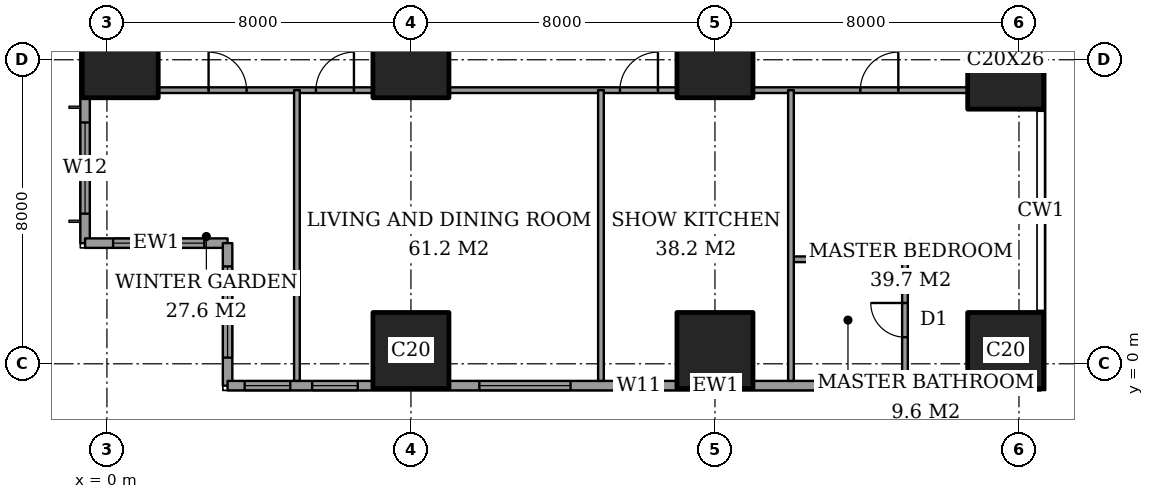
"""IFC4 building model, lengths in metres.
Left out: names, types, materials, properties, quantities, classifications, styles, units other than length and angle.
Written with IfcOpenShell. Run it as: python <this file> out.ifc"""

import sys

from ifc_helpers import new_model, si_unit, direction, frame, frame_2d, origin, origin_2d, place, context, subcontext, project, spatial, rectangle, extrude, element, fill, save


model = new_model("IFC4")
c1 = context("Model", 3, precision=1e-05, world=origin(), true_north=direction((0.0, 1.0)))
c2 = subcontext(c1, "Body", "Model", "MODEL_VIEW")
j1 = project(units=[si_unit("LENGTHUNIT", "METRE"), si_unit("PLANEANGLEUNIT", "RADIAN")], contexts=[c1])
p1 = place(None, origin())
s1 = spatial("IfcSite", under=j1, at=p1, CompositionType="ELEMENT")
p2 = place(p1, origin())
s2 = spatial("IfcBuilding", under=s1, at=p2, CompositionType="ELEMENT")
p3 = place(p2, frame((0.0, 0.0, 161.0)))
s3 = spatial("IfcBuildingStorey", under=s2, at=p3, CompositionType="ELEMENT", Elevation=161.0)
for number, where, z_axis, x_axis in (
    (1, (0.35, 8.0, 0.0), (0.0, 0.0, 1.0), (1.0, 0.0, 0.0)),
    (2, (8.0, 0.35, 0.0), (0.0, 0.0, 1.0), (1.0, 0.0, 0.0)),
    (3, (8.0, 8.0, 0.0), (0.0, 0.0, 1.0), (1.0, 0.0, 0.0)),
    (4, (16.0, 0.35, 0.0), (0.0, 0.0, 1.0), (1.0, 0.0, 0.0)),
    (5, (16.0, 8.0, 0.0), (0.0, 0.0, 1.0), (1.0, 0.0, 0.0)),
    (6, (23.65, 0.35, 0.0), (0.0, 0.0, 1.0), (1.0, 0.0, 0.0)),
):
    element("IfcColumn", number, at=place(p3, frame(where, z_axis=z_axis, x_axis=x_axis)), inside=s3, PredefinedType="COLUMN", context=c2, shape_type="SweptSolid", body=[
        extrude(rectangle(XDim=2.0, YDim=2.0, at=origin_2d()), origin(), (0.0, 0.0, 1.0), 3.6),
    ])
p4 = place(p3, frame((23.65, 8.0, 0.0), z_axis=(0.0, 0.0, 1.0), x_axis=(1.0, 0.0, 0.0)))
e7 = element("IfcColumn", 7, at=p4, inside=s3, PredefinedType="COLUMN", context=c2, shape_type="SweptSolid", body=[
    extrude(rectangle(XDim=2.0, YDim=2.6, at=origin_2d()), origin(), (0.0, 0.0, 1.0), 3.6),
])
p5 = place(p3, frame((-0.575, 44.825, 0.0), z_axis=(0.0, 0.0, 1.0), x_axis=(0.0, -1.0, 0.0)))
e8 = element("IfcWall", 8, at=p5, inside=s3, PredefinedType="SOLIDWALL", context=c2, shape_type="SweptSolid", body=[
    extrude(rectangle(XDim=41.65, YDim=0.25, at=frame_2d((20.825, 0.0))), origin(), (0.0, 0.0, 1.0), 3.6),
])
p6 = place(p5, frame((0.775, 0.0, 0.4)))
e9 = element("IfcOpeningElement", 9, at=p6, cuts=e8, PredefinedType="OPENING", context=c2, shape_type="SweptSolid", body=[
    extrude(rectangle(XDim=2.4, YDim=2.2, at=frame_2d((1.2, 1.1))), frame((0.0, 0.135, 0.0), z_axis=(0.0, -1.0, 0.0), x_axis=(1.0, 0.0, 0.0)), (0.0, 0.0, 1.0), 0.27),
])
p7 = place(p5, frame((6.1, 0.0, 0.4)))
e10 = element("IfcOpeningElement", 10, at=p7, cuts=e8, PredefinedType="OPENING", context=c2, shape_type="SweptSolid", body=[
    extrude(rectangle(XDim=1.2, YDim=2.2, at=frame_2d((0.6, 1.1))), frame((0.0, 0.135, 0.0), z_axis=(0.0, -1.0, 0.0), x_axis=(1.0, 0.0, 0.0)), (0.0, 0.0, 1.0), 0.27),
])
p8 = place(p5, frame((8.425, 0.0, 0.4)))
e11 = element("IfcOpeningElement", 11, at=p8, cuts=e8, PredefinedType="OPENING", context=c2, shape_type="SweptSolid", body=[
    extrude(rectangle(XDim=2.4, YDim=2.2, at=frame_2d((1.2, 1.1))), frame((0.0, 0.135, 0.0), z_axis=(0.0, -1.0, 0.0), x_axis=(1.0, 0.0, 0.0)), (0.0, 0.0, 1.0), 0.27),
])
p9 = place(p5, frame((15.625, 0.0, 0.4)))
e12 = element("IfcOpeningElement", 12, at=p9, cuts=e8, PredefinedType="OPENING", context=c2, shape_type="SweptSolid", body=[
    extrude(rectangle(XDim=2.4, YDim=2.2, at=frame_2d((1.2, 1.1))), frame((0.0, 0.135, 0.0), z_axis=(0.0, -1.0, 0.0), x_axis=(1.0, 0.0, 0.0)), (0.0, 0.0, 1.0), 0.27),
])
p10 = place(p5, frame((23.625, 0.0, 0.4)))
e13 = element("IfcOpeningElement", 13, at=p10, cuts=e8, PredefinedType="OPENING", context=c2, shape_type="SweptSolid", body=[
    extrude(rectangle(XDim=2.4, YDim=2.2, at=frame_2d((1.2, 1.1))), frame((0.0, 0.135, 0.0), z_axis=(0.0, -1.0, 0.0), x_axis=(1.0, 0.0, 0.0)), (0.0, 0.0, 1.0), 0.27),
])
p11 = place(p5, frame((30.825, 0.0, 0.4)))
e14 = element("IfcOpeningElement", 14, at=p11, cuts=e8, PredefinedType="OPENING", context=c2, shape_type="SweptSolid", body=[
    extrude(rectangle(XDim=2.4, YDim=2.2, at=frame_2d((1.2, 1.1))), frame((0.0, 0.135, 0.0), z_axis=(0.0, -1.0, 0.0), x_axis=(1.0, 0.0, 0.0)), (0.0, 0.0, 1.0), 0.27),
])
p12 = place(p5, frame((34.5, 0.0, 0.4)))
e15 = element("IfcOpeningElement", 15, at=p12, cuts=e8, PredefinedType="OPENING", context=c2, shape_type="SweptSolid", body=[
    extrude(rectangle(XDim=1.2, YDim=2.2, at=frame_2d((0.6, 1.1))), frame((0.0, 0.135, 0.0), z_axis=(0.0, -1.0, 0.0), x_axis=(1.0, 0.0, 0.0)), (0.0, 0.0, 1.0), 0.27),
])
p13 = place(p5, frame((38.475, 0.0, 0.4)))
e16 = element("IfcOpeningElement", 16, at=p13, cuts=e8, PredefinedType="OPENING", context=c2, shape_type="SweptSolid", body=[
    extrude(rectangle(XDim=2.4, YDim=2.2, at=frame_2d((1.2, 1.1))), frame((0.0, 0.135, 0.0), z_axis=(0.0, -1.0, 0.0), x_axis=(1.0, 0.0, 0.0)), (0.0, 0.0, 1.0), 0.27),
])
p14 = place(p3, frame((-0.575, 3.175, 0.0), z_axis=(0.0, 0.0, 1.0), x_axis=(1.0, 0.0, 0.0)))
e17 = element("IfcWall", 17, at=p14, inside=s3, PredefinedType="SOLIDWALL", context=c2, shape_type="SweptSolid", body=[
    extrude(rectangle(XDim=3.75, YDim=0.25, at=frame_2d((1.875, 0.0))), origin(), (0.0, 0.0, 1.0), 3.6),
])
p15 = place(p14, frame((0.738, 0.0, 0.4)))
e18 = element("IfcOpeningElement", 18, at=p15, cuts=e17, PredefinedType="OPENING", context=c2, shape_type="SweptSolid", body=[
    extrude(rectangle(XDim=2.4, YDim=2.2, at=frame_2d((1.2, 1.1))), frame((0.0, 0.135, 0.0), z_axis=(0.0, -1.0, 0.0), x_axis=(1.0, 0.0, 0.0)), (0.0, 0.0, 1.0), 0.27),
])
p16 = place(p3, frame((3.175, 3.175, 0.0), z_axis=(0.0, 0.0, 1.0), x_axis=(0.0, -1.0, 0.0)))
e19 = element("IfcWall", 19, at=p16, inside=s3, PredefinedType="SOLIDWALL", context=c2, shape_type="SweptSolid", body=[
    extrude(rectangle(XDim=3.75, YDim=0.25, at=frame_2d((1.875, 0.0))), origin(), (0.0, 0.0, 1.0), 3.6),
])
p17 = place(p16, frame((0.613, 0.0, 0.4)))
e20 = element("IfcOpeningElement", 20, at=p17, cuts=e19, PredefinedType="OPENING", context=c2, shape_type="SweptSolid", body=[
    extrude(rectangle(XDim=2.4, YDim=2.2, at=frame_2d((1.2, 1.1))), frame((0.0, 0.135, 0.0), z_axis=(0.0, -1.0, 0.0), x_axis=(1.0, 0.0, 0.0)), (0.0, 0.0, 1.0), 0.27),
])
p18 = place(p3, frame((3.175, -0.575, 0.0), z_axis=(0.0, 0.0, 1.0), x_axis=(1.0, 0.0, 0.0)))
e21 = element("IfcWall", 21, at=p18, inside=s3, PredefinedType="SOLIDWALL", context=c2, shape_type="SweptSolid", body=[
    extrude(rectangle(XDim=21.4, YDim=0.25, at=frame_2d((10.7, 0.0))), origin(), (0.0, 0.0, 1.0), 3.6),
])
p19 = place(p18, frame((0.45, 0.0, 0.4)))
e22 = element("IfcOpeningElement", 22, at=p19, cuts=e21, PredefinedType="OPENING", context=c2, shape_type="SweptSolid", body=[
    extrude(rectangle(XDim=1.2, YDim=2.2, at=frame_2d((0.6, 1.1))), frame((0.0, 0.135, 0.0), z_axis=(0.0, -1.0, 0.0), x_axis=(1.0, 0.0, 0.0)), (0.0, 0.0, 1.0), 0.27),
])
p20 = place(p18, frame((2.225, 0.0, 0.4)))
e23 = element("IfcOpeningElement", 23, at=p20, cuts=e21, PredefinedType="OPENING", context=c2, shape_type="SweptSolid", body=[
    extrude(rectangle(XDim=1.2, YDim=2.2, at=frame_2d((0.6, 1.1))), frame((0.0, 0.135, 0.0), z_axis=(0.0, -1.0, 0.0), x_axis=(1.0, 0.0, 0.0)), (0.0, 0.0, 1.0), 0.27),
])
p21 = place(p18, frame((6.625, 0.0, 0.4)))
e24 = element("IfcOpeningElement", 24, at=p21, cuts=e21, PredefinedType="OPENING", context=c2, shape_type="SweptSolid", body=[
    extrude(rectangle(XDim=2.4, YDim=2.2, at=frame_2d((1.2, 1.1))), frame((0.0, 0.135, 0.0), z_axis=(0.0, -1.0, 0.0), x_axis=(1.0, 0.0, 0.0)), (0.0, 0.0, 1.0), 0.27),
])
p22 = place(p18, frame((10.225, 0.0, 0.4)))
e25 = element("IfcOpeningElement", 25, at=p22, cuts=e21, PredefinedType="OPENING", context=c2, shape_type="SweptSolid", body=[
    extrude(rectangle(XDim=1.2, YDim=2.2, at=frame_2d((0.6, 1.1))), frame((0.0, 0.135, 0.0), z_axis=(0.0, -1.0, 0.0), x_axis=(1.0, 0.0, 0.0)), (0.0, 0.0, 1.0), 0.27),
])
p23 = place(p18, frame((15.725, 0.0, 0.4)))
e26 = element("IfcOpeningElement", 26, at=p23, cuts=e21, PredefinedType="OPENING", context=c2, shape_type="SweptSolid", body=[
    extrude(rectangle(XDim=1.2, YDim=2.2, at=frame_2d((0.6, 1.1))), frame((0.0, 0.135, 0.0), z_axis=(0.0, -1.0, 0.0), x_axis=(1.0, 0.0, 0.0)), (0.0, 0.0, 1.0), 0.27),
])
p24 = place(p18, frame((18.125, 0.0, 0.4)))
e27 = element("IfcOpeningElement", 27, at=p24, cuts=e21, PredefinedType="OPENING", context=c2, shape_type="SweptSolid", body=[
    extrude(rectangle(XDim=1.2, YDim=2.2, at=frame_2d((0.6, 1.1))), frame((0.0, 0.135, 0.0), z_axis=(0.0, -1.0, 0.0), x_axis=(1.0, 0.0, 0.0)), (0.0, 0.0, 1.0), 0.27),
])
p25 = place(p3, frame((18.0, 2.75, 0.0), z_axis=(0.0, 0.0, 1.0), x_axis=(1.0, 0.0, 0.0)))
e28 = element("IfcWall", 28, at=p25, inside=s3, PredefinedType="PARTITIONING", context=c2, shape_type="SweptSolid", body=[
    extrude(rectangle(XDim=3.0, YDim=0.15, at=frame_2d((1.5, 0.0))), origin(), (0.0, 0.0, 1.0), 3.35),
])
p26 = place(p3, frame((1.35, 7.2, 0.0), z_axis=(0.0, 0.0, 1.0), x_axis=(1.0, 0.0, 0.0)))
e29 = element("IfcWall", 29, at=p26, inside=s3, PredefinedType="PARTITIONING", context=c2, shape_type="SweptSolid", body=[
    extrude(rectangle(XDim=5.65, YDim=0.15, at=frame_2d((2.825, 0.0))), origin(), (0.0, 0.0, 1.0), 3.35),
])
p27 = place(p26, frame((1.325, 0.0, 0.0)))
e30 = element("IfcOpeningElement", 30, at=p27, cuts=e29, PredefinedType="OPENING", context=c2, shape_type="SweptSolid", body=[
    extrude(rectangle(XDim=1.0, YDim=2.1, at=frame_2d((0.5, 1.05))), frame((0.0, 0.085, 0.0), z_axis=(0.0, -1.0, 0.0), x_axis=(1.0, 0.0, 0.0)), (0.0, 0.0, 1.0), 0.17),
])
p28 = place(p26, frame((4.15, 0.0, 0.0)))
e31 = element("IfcOpeningElement", 31, at=p28, cuts=e29, PredefinedType="OPENING", context=c2, shape_type="SweptSolid", body=[
    extrude(rectangle(XDim=1.0, YDim=2.1, at=frame_2d((0.5, 1.05))), frame((0.0, 0.085, 0.0), z_axis=(0.0, -1.0, 0.0), x_axis=(1.0, 0.0, 0.0)), (0.0, 0.0, 1.0), 0.17),
])
p29 = place(p3, frame((9.0, 7.2, 0.0), z_axis=(0.0, 0.0, 1.0), x_axis=(1.0, 0.0, 0.0)))
e32 = element("IfcWall", 32, at=p29, inside=s3, PredefinedType="PARTITIONING", context=c2, shape_type="SweptSolid", body=[
    extrude(rectangle(XDim=6.0, YDim=0.15, at=frame_2d((3.0, 0.0))), origin(), (0.0, 0.0, 1.0), 3.35),
])
p30 = place(p29, frame((4.5, 0.0, 0.0)))
e33 = element("IfcOpeningElement", 33, at=p30, cuts=e32, PredefinedType="OPENING", context=c2, shape_type="SweptSolid", body=[
    extrude(rectangle(XDim=1.0, YDim=2.1, at=frame_2d((0.5, 1.05))), frame((0.0, 0.085, 0.0), z_axis=(0.0, -1.0, 0.0), x_axis=(1.0, 0.0, 0.0)), (0.0, 0.0, 1.0), 0.17),
])
p31 = place(p3, frame((17.0, 7.2, 0.0), z_axis=(0.0, 0.0, 1.0), x_axis=(1.0, 0.0, 0.0)))
e34 = element("IfcWall", 34, at=p31, inside=s3, PredefinedType="PARTITIONING", context=c2, shape_type="SweptSolid", body=[
    extrude(rectangle(XDim=5.65, YDim=0.15, at=frame_2d((2.825, 0.0))), origin(), (0.0, 0.0, 1.0), 3.35),
])
p32 = place(p31, frame((2.825, 0.0, 0.0)))
e35 = element("IfcOpeningElement", 35, at=p32, cuts=e34, PredefinedType="OPENING", context=c2, shape_type="SweptSolid", body=[
    extrude(rectangle(XDim=1.0, YDim=2.1, at=frame_2d((0.5, 1.05))), frame((0.0, 0.085, 0.0), z_axis=(0.0, -1.0, 0.0), x_axis=(1.0, 0.0, 0.0)), (0.0, 0.0, 1.0), 0.17),
])
for number, where, z_axis, x_axis in (
    (36, (5.0, -0.45, 0.0), (0.0, 0.0, 1.0), (0.0, 1.0, 0.0)),
    (37, (13.0, -0.45, 0.0), (0.0, 0.0, 1.0), (0.0, 1.0, 0.0)),
    (38, (18.0, -0.45, 0.0), (0.0, 0.0, 1.0), (0.0, 1.0, 0.0)),
):
    element("IfcWall", number, at=place(p3, frame(where, z_axis=z_axis, x_axis=x_axis)), inside=s3, PredefinedType="PARTITIONING", context=c2, shape_type="SweptSolid", body=[
        extrude(rectangle(XDim=7.65, YDim=0.15, at=frame_2d((3.825, 0.0))), origin(), (0.0, 0.0, 1.0), 3.35),
    ])
p33 = place(p3, frame((21.0, -0.45, 0.0), z_axis=(0.0, 0.0, 1.0), x_axis=(0.0, 1.0, 0.0)))
e39 = element("IfcWall", 39, at=p33, inside=s3, PredefinedType="PARTITIONING", context=c2, shape_type="SweptSolid", body=[
    extrude(rectangle(XDim=3.2, YDim=0.15, at=frame_2d((1.6, 0.0))), origin(), (0.0, 0.0, 1.0), 3.35),
])
p34 = place(p33, frame((1.15, 0.0, 0.0)))
e40 = element("IfcOpeningElement", 40, at=p34, cuts=e39, PredefinedType="OPENING", context=c2, shape_type="SweptSolid", body=[
    extrude(rectangle(XDim=0.9, YDim=2.1, at=frame_2d((0.45, 1.05))), frame((0.0, 0.085, 0.0), z_axis=(0.0, -1.0, 0.0), x_axis=(1.0, 0.0, 0.0)), (0.0, 0.0, 1.0), 0.17),
])
p35 = place(p13, origin())
e41 = element("IfcWindow", 41, at=p35, inside=s3, PartitioningType="SINGLE_PANEL", PredefinedType="WINDOW", context=c2, shape_type="SweptSolid", body=[
    extrude(rectangle(XDim=2.4, YDim=2.2, at=frame_2d((1.2, 1.1))), frame((0.0, 0.03, 0.0), z_axis=(0.0, -1.0, 0.0), x_axis=(1.0, 0.0, 0.0)), (0.0, 0.0, 1.0), 0.06),
])
fill(e16, e41)
p36 = place(p15, origin())
e42 = element("IfcWindow", 42, at=p36, inside=s3, PartitioningType="SINGLE_PANEL", PredefinedType="WINDOW", context=c2, shape_type="SweptSolid", body=[
    extrude(rectangle(XDim=2.4, YDim=2.2, at=frame_2d((1.2, 1.1))), frame((0.0, 0.03, 0.0), z_axis=(0.0, -1.0, 0.0), x_axis=(1.0, 0.0, 0.0)), (0.0, 0.0, 1.0), 0.06),
])
fill(e18, e42)
p37 = place(p17, origin())
e43 = element("IfcWindow", 43, at=p37, inside=s3, PartitioningType="SINGLE_PANEL", PredefinedType="WINDOW", context=c2, shape_type="SweptSolid", body=[
    extrude(rectangle(XDim=2.4, YDim=2.2, at=frame_2d((1.2, 1.1))), frame((0.0, 0.03, 0.0), z_axis=(0.0, -1.0, 0.0), x_axis=(1.0, 0.0, 0.0)), (0.0, 0.0, 1.0), 0.06),
])
fill(e20, e43)
p38 = place(p19, origin())
e44 = element("IfcWindow", 44, at=p38, inside=s3, PartitioningType="SINGLE_PANEL", PredefinedType="WINDOW", context=c2, shape_type="SweptSolid", body=[
    extrude(rectangle(XDim=1.2, YDim=2.2, at=frame_2d((0.6, 1.1))), frame((0.0, 0.03, 0.0), z_axis=(0.0, -1.0, 0.0), x_axis=(1.0, 0.0, 0.0)), (0.0, 0.0, 1.0), 0.06),
])
fill(e22, e44)
p39 = place(p20, origin())
e45 = element("IfcWindow", 45, at=p39, inside=s3, PartitioningType="SINGLE_PANEL", PredefinedType="WINDOW", context=c2, shape_type="SweptSolid", body=[
    extrude(rectangle(XDim=1.2, YDim=2.2, at=frame_2d((0.6, 1.1))), frame((0.0, 0.03, 0.0), z_axis=(0.0, -1.0, 0.0), x_axis=(1.0, 0.0, 0.0)), (0.0, 0.0, 1.0), 0.06),
])
fill(e23, e45)
p40 = place(p21, origin())
e46 = element("IfcWindow", 46, at=p40, inside=s3, PartitioningType="SINGLE_PANEL", PredefinedType="WINDOW", context=c2, shape_type="SweptSolid", body=[
    extrude(rectangle(XDim=2.4, YDim=2.2, at=frame_2d((1.2, 1.1))), frame((0.0, 0.03, 0.0), z_axis=(0.0, -1.0, 0.0), x_axis=(1.0, 0.0, 0.0)), (0.0, 0.0, 1.0), 0.06),
])
fill(e24, e46)
p41 = place(p22, origin())
e47 = element("IfcWindow", 47, at=p41, inside=s3, PartitioningType="SINGLE_PANEL", PredefinedType="WINDOW", context=c2, shape_type="SweptSolid", body=[
    extrude(rectangle(XDim=1.2, YDim=2.2, at=frame_2d((0.6, 1.1))), frame((0.0, 0.03, 0.0), z_axis=(0.0, -1.0, 0.0), x_axis=(1.0, 0.0, 0.0)), (0.0, 0.0, 1.0), 0.06),
])
fill(e25, e47)
p42 = place(p23, origin())
e48 = element("IfcWindow", 48, at=p42, inside=s3, PartitioningType="SINGLE_PANEL", PredefinedType="WINDOW", context=c2, shape_type="SweptSolid", body=[
    extrude(rectangle(XDim=1.2, YDim=2.2, at=frame_2d((0.6, 1.1))), frame((0.0, 0.03, 0.0), z_axis=(0.0, -1.0, 0.0), x_axis=(1.0, 0.0, 0.0)), (0.0, 0.0, 1.0), 0.06),
])
fill(e26, e48)
p43 = place(p24, origin())
e49 = element("IfcWindow", 49, at=p43, inside=s3, PartitioningType="SINGLE_PANEL", PredefinedType="WINDOW", context=c2, shape_type="SweptSolid", body=[
    extrude(rectangle(XDim=1.2, YDim=2.2, at=frame_2d((0.6, 1.1))), frame((0.0, 0.03, 0.0), z_axis=(0.0, -1.0, 0.0), x_axis=(1.0, 0.0, 0.0)), (0.0, 0.0, 1.0), 0.06),
])
fill(e27, e49)
p44 = place(p27, origin())
e50 = element("IfcDoor", 50, at=p44, inside=s3, OperationType="SINGLE_SWING_RIGHT", PredefinedType="DOOR", context=c2, shape_type="SweptSolid", body=[
    extrude(rectangle(XDim=1.0, YDim=2.1, at=frame_2d((0.5, 1.05))), frame((0.0, 0.025, 0.0), z_axis=(0.0, -1.0, 0.0), x_axis=(1.0, 0.0, 0.0)), (0.0, 0.0, 1.0), 0.05),
])
fill(e30, e50)
p45 = place(p28, origin())
e51 = element("IfcDoor", 51, at=p45, inside=s3, OperationType="SINGLE_SWING_LEFT", PredefinedType="DOOR", context=c2, shape_type="SweptSolid", body=[
    extrude(rectangle(XDim=1.0, YDim=2.1, at=frame_2d((0.5, 1.05))), frame((0.0, 0.025, 0.0), z_axis=(0.0, -1.0, 0.0), x_axis=(1.0, 0.0, 0.0)), (0.0, 0.0, 1.0), 0.05),
])
fill(e31, e51)
p46 = place(p30, origin())
e52 = element("IfcDoor", 52, at=p46, inside=s3, OperationType="SINGLE_SWING_LEFT", PredefinedType="DOOR", context=c2, shape_type="SweptSolid", body=[
    extrude(rectangle(XDim=1.0, YDim=2.1, at=frame_2d((0.5, 1.05))), frame((0.0, 0.025, 0.0), z_axis=(0.0, -1.0, 0.0), x_axis=(1.0, 0.0, 0.0)), (0.0, 0.0, 1.0), 0.05),
])
fill(e33, e52)
p47 = place(p34, origin())
e53 = element("IfcDoor", 53, at=p47, inside=s3, OperationType="SINGLE_SWING_LEFT", PredefinedType="DOOR", context=c2, shape_type="SweptSolid", body=[
    extrude(rectangle(XDim=0.9, YDim=2.1, at=frame_2d((0.45, 1.05))), frame((0.0, 0.025, 0.0), z_axis=(0.0, -1.0, 0.0), x_axis=(1.0, 0.0, 0.0)), (0.0, 0.0, 1.0), 0.05),
])
fill(e40, e53)
p48 = place(p32, origin())
e54 = element("IfcDoor", 54, at=p48, inside=s3, OperationType="SINGLE_SWING_LEFT", PredefinedType="DOOR", context=c2, shape_type="SweptSolid", body=[
    extrude(rectangle(XDim=1.0, YDim=2.1, at=frame_2d((0.5, 1.05))), frame((0.0, 0.025, 0.0), z_axis=(0.0, -1.0, 0.0), x_axis=(1.0, 0.0, 0.0)), (0.0, 0.0, 1.0), 0.05),
])
fill(e35, e54)
save(model, sys.argv[1])
